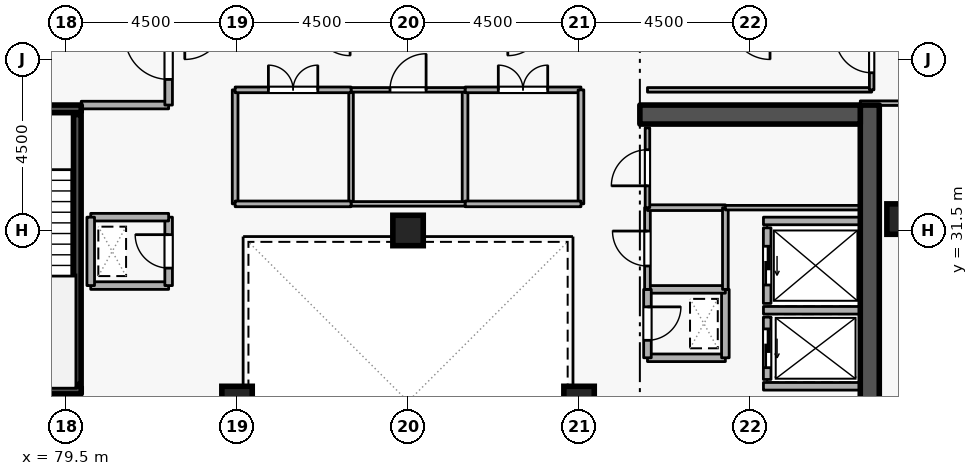
"""IFC4 building model, lengths in metres.
Left out: names, types, materials, properties, quantities, classifications, styles, units other than length and angle.
Written with IfcOpenShell. Run it as: python <this file> out.ifc"""

import sys

from ifc_helpers import new_model, si_unit, direction, frame, frame_2d, origin, origin_2d, place, context, subcontext, project, spatial, rectangle, extrude, element, fill, save


model = new_model("IFC4")
c1 = context("Model", 3, precision=1e-05, world=origin(), true_north=direction((0.0, 1.0)))
c2 = subcontext(c1, "Body", "Model", "MODEL_VIEW")
j1 = project(units=[si_unit("LENGTHUNIT", "METRE"), si_unit("PLANEANGLEUNIT", "RADIAN")], contexts=[c1])
p1 = place(None, origin())
s1 = spatial("IfcSite", under=j1, at=p1, CompositionType="ELEMENT")
p2 = place(p1, origin())
s2 = spatial("IfcBuilding", under=s1, at=p2, CompositionType="ELEMENT")
p3 = place(p2, frame((0.0, 0.0, 272.7)))
s3 = spatial("IfcBuildingStorey", under=s2, at=p3, CompositionType="ELEMENT", Elevation=272.7)
p4 = place(p3, frame((100.65, 19.2, 0.0), z_axis=(0.0, 0.0, 1.0), x_axis=(0.0, 1.0, 0.0)))
e1 = element("IfcWall", 1, at=p4, inside=s3, PredefinedType="SHEAR", context=c2, shape_type="SweptSolid", body=[
    extrude(rectangle(XDim=15.6, YDim=0.5, at=frame_2d((7.8, 0.0))), origin(), (0.0, 0.0, 1.0), 3.6),
])
p5 = place(p3, frame((94.6, 34.55, 0.0), z_axis=(0.0, 0.0, 1.0), x_axis=(1.0, 0.0, 0.0)))
e2 = element("IfcWall", 2, at=p5, inside=s3, PredefinedType="SHEAR", context=c2, shape_type="SweptSolid", body=[
    extrude(rectangle(XDim=5.8, YDim=0.5, at=frame_2d((2.9, 0.0))), origin(), (0.0, 0.0, 1.0), 3.6),
])
for number, where, z_axis, x_axis in (
    (3, (101.5, 31.8, 0.0), (0.0, 0.0, 1.0), (1.0, 0.0, 0.0)),
    (4, (93.0, 27.0, 0.0), (0.0, 0.0, 1.0), (1.0, 0.0, 0.0)),
    (5, (84.0, 27.0, 0.0), (0.0, 0.0, 1.0), (1.0, 0.0, 0.0)),
    (6, (88.5, 31.5, 0.0), (0.0, 0.0, 1.0), (1.0, 0.0, 0.0)),
):
    element("IfcColumn", number, at=place(p3, frame(where, z_axis=z_axis, x_axis=x_axis)), inside=s3, PredefinedType="COLUMN", context=c2, shape_type="SweptSolid", body=[
        extrude(rectangle(XDim=0.8, YDim=0.8, at=origin_2d()), origin(), (0.0, 0.0, 1.0), 3.6),
    ])
p6 = place(p3, frame((97.95, 29.22, 0.0), z_axis=(0.0, 0.0, 1.0), x_axis=(0.0, -1.0, 0.0)))
e7 = element("IfcWall", 7, at=p6, inside=s3, PredefinedType="STANDARD", context=c2, shape_type="SweptSolid", body=[
    extrude(rectangle(XDim=1.64, YDim=0.2, at=frame_2d((0.82, 0.0))), origin(), (0.0, 0.0, 1.0), 3.34),
])
p7 = place(p6, frame((0.31, 0.0, 0.0)))
e8 = element("IfcOpeningElement", 8, at=p7, cuts=e7, PredefinedType="OPENING", context=c2, shape_type="SweptSolid", body=[
    extrude(rectangle(XDim=1.02, YDim=2.06, at=frame_2d((0.51, 1.03))), frame((0.0, 0.11, 0.0), z_axis=(0.0, -1.0, 0.0), x_axis=(1.0, 0.0, 0.0)), (0.0, 0.0, 1.0), 0.22),
])
p8 = place(p3, frame((97.95, 31.57, 0.0), z_axis=(0.0, 0.0, 1.0), x_axis=(0.0, -1.0, 0.0)))
e9 = element("IfcWall", 9, at=p8, inside=s3, PredefinedType="STANDARD", context=c2, shape_type="SweptSolid", body=[
    extrude(rectangle(XDim=1.99, YDim=0.2, at=frame_2d((0.995, 0.0))), origin(), (0.0, 0.0, 1.0), 3.34),
])
p9 = place(p8, frame((0.485, 0.0, 0.0)))
e10 = element("IfcOpeningElement", 10, at=p9, cuts=e9, PredefinedType="OPENING", context=c2, shape_type="SweptSolid", body=[
    extrude(rectangle(XDim=1.02, YDim=2.06, at=frame_2d((0.51, 1.03))), frame((0.0, 0.11, 0.0), z_axis=(0.0, -1.0, 0.0), x_axis=(1.0, 0.0, 0.0)), (0.0, 0.0, 1.0), 0.22),
])
for number, where, z_axis, x_axis in (
    (11, (97.852, 29.4, 0.0), (0.0, 0.0, 1.0), (1.0, 0.0, 0.0)),
    (12, (97.852, 27.4, 0.0), (0.0, 0.0, 1.0), (1.0, 0.0, 0.0)),
    (13, (97.852, 31.75, 0.0), (0.0, 0.0, 1.0), (1.0, 0.0, 0.0)),
):
    element("IfcWall", number, at=place(p3, frame(where, z_axis=z_axis, x_axis=x_axis)), inside=s3, PredefinedType="STANDARD", context=c2, shape_type="SweptSolid", body=[
        extrude(rectangle(XDim=2.536, YDim=0.2, at=frame_2d((1.268, 0.0))), origin(), (0.0, 0.0, 1.0), 3.34),
    ])
p10 = place(p3, frame((76.55, 34.7, 0.0), z_axis=(0.0, 0.0, 1.0), x_axis=(1.0, 0.0, 0.0)))
e14 = element("IfcWall", 14, at=p10, inside=s3, PredefinedType="SHEAR", context=c2, shape_type="SweptSolid", body=[
    extrude(rectangle(XDim=3.35, YDim=0.2, at=frame_2d((1.675, 0.0))), origin(), (0.0, 0.0, 1.0), 3.6),
])
p11 = place(p10, frame((1.125, 0.0, 0.0)))
e15 = element("IfcOpeningElement", 15, at=p11, cuts=e14, PredefinedType="OPENING", context=c2, shape_type="SweptSolid", body=[
    extrude(rectangle(XDim=1.1, YDim=2.1, at=frame_2d((0.55, 1.05))), frame((0.0, 0.11, 0.0), z_axis=(0.0, -1.0, 0.0), x_axis=(1.0, 0.0, 0.0)), (0.0, 0.0, 1.0), 0.22),
])
p12 = place(p3, frame((79.9, 27.3, 0.0), z_axis=(0.0, 0.0, 1.0), x_axis=(-1.0, 0.0, 0.0)))
e16 = element("IfcWall", 16, at=p12, inside=s3, PredefinedType="SHEAR", context=c2, shape_type="SweptSolid", body=[
    extrude(rectangle(XDim=3.35, YDim=0.2, at=frame_2d((1.675, 0.0))), origin(), (0.0, 0.0, 1.0), 3.6),
])
p13 = place(p3, frame((79.797, 27.45, 0.0), z_axis=(0.0, 0.0, 1.0), x_axis=(0.0, 1.0, 0.0)))
e17 = element("IfcWall", 17, at=p13, inside=s3, PredefinedType="SHEAR", context=c2, shape_type="SweptSolid", body=[
    extrude(rectangle(XDim=7.1, YDim=0.2, at=frame_2d((3.55, 0.0))), origin(), (0.0, 0.0, 1.0), 3.6),
])
p14 = place(p3, frame((79.9, 34.8, 0.0), z_axis=(0.0, 0.0, 1.0), x_axis=(1.0, 0.0, 0.0)))
e18 = element("IfcWall", 18, at=p14, inside=s3, PredefinedType="STANDARD", context=c2, shape_type="SweptSolid", body=[
    extrude(rectangle(XDim=2.3, YDim=0.2, at=frame_2d((1.15, 0.0))), origin(), (0.0, 0.0, 1.0), 2.545),
])
p15 = place(p3, frame((82.2, 34.8, 0.0), z_axis=(0.0, 0.0, 1.0), x_axis=(0.0, 1.0, 0.0)))
e19 = element("IfcWall", 19, at=p15, inside=s3, PredefinedType="STANDARD", context=c2, shape_type="SweptSolid", body=[
    extrude(rectangle(XDim=2.5, YDim=0.2, at=frame_2d((1.25, 0.0))), origin(), (0.0, 0.0, 1.0), 3.34),
])
p16 = place(p15, frame((0.675, 0.0, 0.0)))
e20 = element("IfcOpeningElement", 20, at=p16, cuts=e19, PredefinedType="OPENING", context=c2, shape_type="SweptSolid", body=[
    extrude(rectangle(XDim=1.15, YDim=2.1, at=frame_2d((0.575, 1.05))), frame((0.0, 0.11, 0.0), z_axis=(0.0, -1.0, 0.0), x_axis=(1.0, 0.0, 0.0)), (0.0, 0.0, 1.0), 0.22),
])
p17 = place(p3, frame((94.8, 28.15, 0.0), z_axis=(0.0, 0.0, 1.0), x_axis=(1.0, 0.0, 0.0)))
e21 = element("IfcWall", 21, at=p17, inside=s3, PredefinedType="STANDARD", context=c2, shape_type="SweptSolid", body=[
    extrude(rectangle(XDim=2.05, YDim=0.2, at=frame_2d((1.025, 0.0))), origin(), (0.0, 0.0, 1.0), 3.34),
])
p18 = place(p3, frame((96.85, 28.15, 0.0), z_axis=(0.0, 0.0, 1.0), x_axis=(0.0, 1.0, 0.0)))
e22 = element("IfcWall", 22, at=p18, inside=s3, PredefinedType="STANDARD", context=c2, shape_type="SweptSolid", body=[
    extrude(rectangle(XDim=1.8, YDim=0.2, at=frame_2d((0.9, 0.0))), origin(), (0.0, 0.0, 1.0), 3.34),
])
p19 = place(p3, frame((96.85, 29.95, 0.0), z_axis=(0.0, 0.0, 1.0), x_axis=(-1.0, 0.0, 0.0)))
e23 = element("IfcWall", 23, at=p19, inside=s3, PredefinedType="STANDARD", context=c2, shape_type="SweptSolid", body=[
    extrude(rectangle(XDim=2.05, YDim=0.2, at=frame_2d((1.025, 0.0))), origin(), (0.0, 0.0, 1.0), 3.34),
])
p20 = place(p3, frame((94.8, 29.95, 0.0), z_axis=(0.0, 0.0, 1.0), x_axis=(0.0, -1.0, 0.0)))
e24 = element("IfcWall", 24, at=p20, inside=s3, PredefinedType="STANDARD", context=c2, shape_type="SweptSolid", body=[
    extrude(rectangle(XDim=1.8, YDim=0.2, at=frame_2d((0.9, 0.0))), origin(), (0.0, 0.0, 1.0), 3.34),
])
p21 = place(p20, frame((0.46, 0.0, 0.0)))
e25 = element("IfcOpeningElement", 25, at=p21, cuts=e24, PredefinedType="OPENING", context=c2, shape_type="SweptSolid", body=[
    extrude(rectangle(XDim=0.88, YDim=2.04, at=frame_2d((0.44, 1.02))), frame((0.0, 0.11, 0.0), z_axis=(0.0, -1.0, 0.0), x_axis=(1.0, 0.0, 0.0)), (0.0, 0.0, 1.0), 0.22),
])
p22 = place(p3, frame((80.15, 30.05, 0.0), z_axis=(0.0, 0.0, 1.0), x_axis=(1.0, 0.0, 0.0)))
e26 = element("IfcWall", 26, at=p22, inside=s3, PredefinedType="STANDARD", context=c2, shape_type="SweptSolid", body=[
    extrude(rectangle(XDim=2.05, YDim=0.2, at=frame_2d((1.025, 0.0))), origin(), (0.0, 0.0, 1.0), 3.34),
])
p23 = place(p3, frame((82.2, 30.05, 0.0), z_axis=(0.0, 0.0, 1.0), x_axis=(0.0, 1.0, 0.0)))
e27 = element("IfcWall", 27, at=p23, inside=s3, PredefinedType="STANDARD", context=c2, shape_type="SweptSolid", body=[
    extrude(rectangle(XDim=1.8, YDim=0.2, at=frame_2d((0.9, 0.0))), origin(), (0.0, 0.0, 1.0), 3.34),
])
p24 = place(p23, frame((0.46, 0.0, 0.0)))
e28 = element("IfcOpeningElement", 28, at=p24, cuts=e27, PredefinedType="OPENING", context=c2, shape_type="SweptSolid", body=[
    extrude(rectangle(XDim=0.88, YDim=2.04, at=frame_2d((0.44, 1.02))), frame((0.0, 0.11, 0.0), z_axis=(0.0, -1.0, 0.0), x_axis=(1.0, 0.0, 0.0)), (0.0, 0.0, 1.0), 0.22),
])
p25 = place(p3, frame((82.2, 31.85, 0.0), z_axis=(0.0, 0.0, 1.0), x_axis=(-1.0, 0.0, 0.0)))
e29 = element("IfcWall", 29, at=p25, inside=s3, PredefinedType="STANDARD", context=c2, shape_type="SweptSolid", body=[
    extrude(rectangle(XDim=2.05, YDim=0.2, at=frame_2d((1.025, 0.0))), origin(), (0.0, 0.0, 1.0), 3.34),
])
p26 = place(p3, frame((80.15, 31.85, 0.0), z_axis=(0.0, 0.0, 1.0), x_axis=(0.0, -1.0, 0.0)))
e30 = element("IfcWall", 30, at=p26, inside=s3, PredefinedType="STANDARD", context=c2, shape_type="SweptSolid", body=[
    extrude(rectangle(XDim=1.8, YDim=0.2, at=frame_2d((0.9, 0.0))), origin(), (0.0, 0.0, 1.0), 3.34),
])
p27 = place(p3, frame((94.8, 29.95, 0.0), z_axis=(0.0, 0.0, 1.0), x_axis=(0.0, 1.0, 0.0)))
e31 = element("IfcWall", 31, at=p27, inside=s3, PredefinedType="PARTITIONING", context=c2, shape_type="SweptSolid", body=[
    extrude(rectangle(XDim=2.15, YDim=0.15, at=frame_2d((1.075, 0.0))), origin(), (0.0, 0.0, 1.0), 3.34),
])
p28 = place(p27, frame((0.615, 0.0, 0.0)))
e32 = element("IfcOpeningElement", 32, at=p28, cuts=e31, PredefinedType="OPENING", context=c2, shape_type="SweptSolid", body=[
    extrude(rectangle(XDim=0.92, YDim=2.08, at=frame_2d((0.46, 1.04))), frame((0.0, 0.085, 0.0), z_axis=(0.0, -1.0, 0.0), x_axis=(1.0, 0.0, 0.0)), (0.0, 0.0, 1.0), 0.17),
])
p29 = place(p3, frame((94.8, 32.1, 0.0), z_axis=(0.0, 0.0, 1.0), x_axis=(1.0, 0.0, 0.0)))
e33 = element("IfcWall", 33, at=p29, inside=s3, PredefinedType="PARTITIONING", context=c2, shape_type="SweptSolid", body=[
    extrude(rectangle(XDim=2.05, YDim=0.15, at=frame_2d((1.025, 0.0))), origin(), (0.0, 0.0, 1.0), 3.34),
])
p30 = place(p3, frame((96.85, 32.1, 0.0), z_axis=(0.0, 0.0, 1.0), x_axis=(0.0, -1.0, 0.0)))
e34 = element("IfcWall", 34, at=p30, inside=s3, PredefinedType="PARTITIONING", context=c2, shape_type="SweptSolid", body=[
    extrude(rectangle(XDim=2.15, YDim=0.15, at=frame_2d((1.075, 0.0))), origin(), (0.0, 0.0, 1.0), 3.34),
])
p31 = place(p3, frame((94.8, 32.1, 0.0), z_axis=(0.0, 0.0, 1.0), x_axis=(0.0, 1.0, 0.0)))
e35 = element("IfcWall", 35, at=p31, inside=s3, PredefinedType="PARTITIONING", context=c2, shape_type="SweptSolid", body=[
    extrude(rectangle(XDim=2.1, YDim=0.12, at=frame_2d((1.05, 0.0))), origin(), (0.0, 0.0, 1.0), 3.34),
])
p32 = place(p31, frame((0.575, 0.0, 0.0)))
e36 = element("IfcOpeningElement", 36, at=p32, cuts=e35, PredefinedType="OPENING", context=c2, shape_type="SweptSolid", body=[
    extrude(rectangle(XDim=0.95, YDim=2.1, at=frame_2d((0.475, 1.05))), frame((0.0, 0.07, 0.0), z_axis=(0.0, -1.0, 0.0), x_axis=(1.0, 0.0, 0.0)), (0.0, 0.0, 1.0), 0.14),
])
p33 = place(p3, frame((100.4, 32.1, 0.0), z_axis=(0.0, 0.0, 1.0), x_axis=(-1.0, 0.0, 0.0)))
e37 = element("IfcWall", 37, at=p33, inside=s3, PredefinedType="PARTITIONING", context=c2, shape_type="SweptSolid", body=[
    extrude(rectangle(XDim=3.55, YDim=0.12, at=frame_2d((1.775, 0.0))), origin(), (0.0, 0.0, 1.0), 3.34),
])
p34 = place(p3, frame((94.8, 35.2, 0.0), z_axis=(0.0, 0.0, 1.0), x_axis=(1.0, 0.0, 0.0)))
e38 = element("IfcWall", 38, at=p34, inside=s3, PredefinedType="PARTITIONING", context=c2, shape_type="SweptSolid", body=[
    extrude(rectangle(XDim=5.9, YDim=0.12, at=frame_2d((2.95, 0.0))), origin(), (0.0, 0.0, 1.0), 3.34),
])
p35 = place(p3, frame((100.7, 35.2, 0.0), z_axis=(0.0, 0.0, 1.0), x_axis=(0.0, 1.0, 0.0)))
e39 = element("IfcWall", 39, at=p35, inside=s3, PredefinedType="PARTITIONING", context=c2, shape_type="SweptSolid", body=[
    extrude(rectangle(XDim=1.85, YDim=0.12, at=frame_2d((0.925, 0.0))), origin(), (0.0, 0.0, 1.0), 3.34),
])
p36 = place(p35, frame((0.45, 0.0, 0.0)))
e40 = element("IfcOpeningElement", 40, at=p36, cuts=e39, PredefinedType="OPENING", context=c2, shape_type="SweptSolid", body=[
    extrude(rectangle(XDim=0.95, YDim=2.1, at=frame_2d((0.475, 1.05))), frame((0.0, 0.07, 0.0), z_axis=(0.0, -1.0, 0.0), x_axis=(1.0, 0.0, 0.0)), (0.0, 0.0, 1.0), 0.14),
])
p37 = place(p3, frame((112.22, 34.85, 0.0), z_axis=(0.0, 0.0, 1.0), x_axis=(-1.0, 0.0, 0.0)))
e41 = element("IfcWall", 41, at=p37, inside=s3, PredefinedType="PARTITIONING", context=c2, shape_type="SweptSolid", body=[
    extrude(rectangle(XDim=11.82, YDim=0.12, at=frame_2d((5.91, 0.0))), origin(), (0.0, 0.0, 1.0), 2.545),
])
p38 = place(p3, frame((90.0, 32.2, 0.0), z_axis=(0.0, 0.0, 1.0), x_axis=(0.0, 1.0, 0.0)))
e42 = element("IfcWall", 42, at=p38, inside=s3, PredefinedType="PARTITIONING", context=c2, shape_type="SweptSolid", body=[
    extrude(rectangle(XDim=3.0, YDim=0.15, at=frame_2d((1.5, 0.0))), origin(), (0.0, 0.0, 1.0), 3.34),
])
p39 = place(p3, frame((90.0, 35.2, 0.0), z_axis=(0.0, 0.0, 1.0), x_axis=(1.0, 0.0, 0.0)))
e43 = element("IfcWall", 43, at=p39, inside=s3, PredefinedType="PARTITIONING", context=c2, shape_type="SweptSolid", body=[
    extrude(rectangle(XDim=3.05, YDim=0.15, at=frame_2d((1.525, 0.0))), origin(), (0.0, 0.0, 1.0), 3.34),
])
p40 = place(p39, frame((0.875, 0.0, 0.0)))
e44 = element("IfcOpeningElement", 44, at=p40, cuts=e43, PredefinedType="OPENING", context=c2, shape_type="SweptSolid", body=[
    extrude(rectangle(XDim=1.3, YDim=2.12, at=frame_2d((0.65, 1.06))), frame((0.0, 0.085, 0.0), z_axis=(0.0, -1.0, 0.0), x_axis=(1.0, 0.0, 0.0)), (0.0, 0.0, 1.0), 0.17),
])
p41 = place(p3, frame((93.05, 35.2, 0.0), z_axis=(0.0, 0.0, 1.0), x_axis=(0.0, -1.0, 0.0)))
e45 = element("IfcWall", 45, at=p41, inside=s3, PredefinedType="PARTITIONING", context=c2, shape_type="SweptSolid", body=[
    extrude(rectangle(XDim=3.0, YDim=0.15, at=frame_2d((1.5, 0.0))), origin(), (0.0, 0.0, 1.0), 3.34),
])
p42 = place(p3, frame((93.05, 32.2, 0.0), z_axis=(0.0, 0.0, 1.0), x_axis=(-1.0, 0.0, 0.0)))
e46 = element("IfcWall", 46, at=p42, inside=s3, PredefinedType="PARTITIONING", context=c2, shape_type="SweptSolid", body=[
    extrude(rectangle(XDim=3.05, YDim=0.15, at=frame_2d((1.525, 0.0))), origin(), (0.0, 0.0, 1.0), 3.34),
])
p43 = place(p3, frame((87.0, 32.2, 0.0), z_axis=(0.0, 0.0, 1.0), x_axis=(0.0, 1.0, 0.0)))
e47 = element("IfcWall", 47, at=p43, inside=s3, PredefinedType="PARTITIONING", context=c2, shape_type="SweptSolid", body=[
    extrude(rectangle(XDim=3.0, YDim=0.12, at=frame_2d((1.5, 0.0))), origin(), (0.0, 0.0, 1.0), 3.34),
])
p44 = place(p3, frame((87.0, 35.2, 0.0), z_axis=(0.0, 0.0, 1.0), x_axis=(1.0, 0.0, 0.0)))
e48 = element("IfcWall", 48, at=p44, inside=s3, PredefinedType="PARTITIONING", context=c2, shape_type="SweptSolid", body=[
    extrude(rectangle(XDim=3.0, YDim=0.12, at=frame_2d((1.5, 0.0))), origin(), (0.0, 0.0, 1.0), 3.34),
])
p45 = place(p44, frame((1.025, 0.0, 0.0)))
e49 = element("IfcOpeningElement", 49, at=p45, cuts=e48, PredefinedType="OPENING", context=c2, shape_type="SweptSolid", body=[
    extrude(rectangle(XDim=0.95, YDim=2.1, at=frame_2d((0.475, 1.05))), frame((0.0, 0.07, 0.0), z_axis=(0.0, -1.0, 0.0), x_axis=(1.0, 0.0, 0.0)), (0.0, 0.0, 1.0), 0.14),
])
p46 = place(p3, frame((90.0, 32.2, 0.0), z_axis=(0.0, 0.0, 1.0), x_axis=(-1.0, 0.0, 0.0)))
e50 = element("IfcWall", 50, at=p46, inside=s3, PredefinedType="PARTITIONING", context=c2, shape_type="SweptSolid", body=[
    extrude(rectangle(XDim=3.0, YDim=0.12, at=frame_2d((1.5, 0.0))), origin(), (0.0, 0.0, 1.0), 3.34),
])
p47 = place(p3, frame((83.95, 32.2, 0.0), z_axis=(0.0, 0.0, 1.0), x_axis=(0.0, 1.0, 0.0)))
e51 = element("IfcWall", 51, at=p47, inside=s3, PredefinedType="PARTITIONING", context=c2, shape_type="SweptSolid", body=[
    extrude(rectangle(XDim=3.0, YDim=0.15, at=frame_2d((1.5, 0.0))), origin(), (0.0, 0.0, 1.0), 3.34),
])
p48 = place(p3, frame((83.95, 35.2, 0.0), z_axis=(0.0, 0.0, 1.0), x_axis=(1.0, 0.0, 0.0)))
e52 = element("IfcWall", 52, at=p48, inside=s3, PredefinedType="PARTITIONING", context=c2, shape_type="SweptSolid", body=[
    extrude(rectangle(XDim=3.05, YDim=0.15, at=frame_2d((1.525, 0.0))), origin(), (0.0, 0.0, 1.0), 3.34),
])
p49 = place(p48, frame((0.875, 0.0, 0.0)))
e53 = element("IfcOpeningElement", 53, at=p49, cuts=e52, PredefinedType="OPENING", context=c2, shape_type="SweptSolid", body=[
    extrude(rectangle(XDim=1.3, YDim=2.12, at=frame_2d((0.65, 1.06))), frame((0.0, 0.085, 0.0), z_axis=(0.0, -1.0, 0.0), x_axis=(1.0, 0.0, 0.0)), (0.0, 0.0, 1.0), 0.17),
])
p50 = place(p3, frame((87.0, 32.2, 0.0), z_axis=(0.0, 0.0, 1.0), x_axis=(-1.0, 0.0, 0.0)))
e54 = element("IfcWall", 54, at=p50, inside=s3, PredefinedType="PARTITIONING", context=c2, shape_type="SweptSolid", body=[
    extrude(rectangle(XDim=3.05, YDim=0.15, at=frame_2d((1.525, 0.0))), origin(), (0.0, 0.0, 1.0), 3.34),
])
p51 = place(p7, origin())
e55 = element("IfcDoor", 55, at=p51, inside=s3, OperationType="SLIDING_TO_LEFT", PredefinedType="DOOR", context=c2, shape_type="SweptSolid", body=[
    extrude(rectangle(XDim=1.02, YDim=2.06, at=frame_2d((0.51, 1.03))), frame((0.0, 0.025, 0.0), z_axis=(0.0, -1.0, 0.0), x_axis=(1.0, 0.0, 0.0)), (0.0, 0.0, 1.0), 0.05),
])
fill(e8, e55)
p52 = place(p9, origin())
e56 = element("IfcDoor", 56, at=p52, inside=s3, OperationType="SLIDING_TO_LEFT", PredefinedType="DOOR", context=c2, shape_type="SweptSolid", body=[
    extrude(rectangle(XDim=1.02, YDim=2.06, at=frame_2d((0.51, 1.03))), frame((0.0, 0.025, 0.0), z_axis=(0.0, -1.0, 0.0), x_axis=(1.0, 0.0, 0.0)), (0.0, 0.0, 1.0), 0.05),
])
fill(e10, e56)
p53 = place(p16, origin())
e57 = element("IfcDoor", 57, at=p53, inside=s3, OperationType="SINGLE_SWING_RIGHT", PredefinedType="DOOR", context=c2, shape_type="SweptSolid", body=[
    extrude(rectangle(XDim=1.15, YDim=2.1, at=frame_2d((0.575, 1.05))), frame((0.0, 0.025, 0.0), z_axis=(0.0, -1.0, 0.0), x_axis=(1.0, 0.0, 0.0)), (0.0, 0.0, 1.0), 0.05),
])
fill(e20, e57)
p54 = place(p21, origin())
e58 = element("IfcDoor", 58, at=p54, inside=s3, OperationType="SINGLE_SWING_LEFT", PredefinedType="DOOR", context=c2, shape_type="SweptSolid", body=[
    extrude(rectangle(XDim=0.88, YDim=2.04, at=frame_2d((0.44, 1.02))), frame((0.0, 0.025, 0.0), z_axis=(0.0, -1.0, 0.0), x_axis=(1.0, 0.0, 0.0)), (0.0, 0.0, 1.0), 0.05),
])
fill(e25, e58)
p55 = place(p24, origin())
e59 = element("IfcDoor", 59, at=p55, inside=s3, OperationType="SINGLE_SWING_RIGHT", PredefinedType="DOOR", context=c2, shape_type="SweptSolid", body=[
    extrude(rectangle(XDim=0.88, YDim=2.04, at=frame_2d((0.44, 1.02))), frame((0.0, 0.025, 0.0), z_axis=(0.0, -1.0, 0.0), x_axis=(1.0, 0.0, 0.0)), (0.0, 0.0, 1.0), 0.05),
])
fill(e28, e59)
p56 = place(p28, origin())
e60 = element("IfcDoor", 60, at=p56, inside=s3, OperationType="SINGLE_SWING_RIGHT", PredefinedType="DOOR", context=c2, shape_type="SweptSolid", body=[
    extrude(rectangle(XDim=0.92, YDim=2.08, at=frame_2d((0.46, 1.04))), frame((0.0, 0.025, 0.0), z_axis=(0.0, -1.0, 0.0), x_axis=(1.0, 0.0, 0.0)), (0.0, 0.0, 1.0), 0.05),
])
fill(e32, e60)
p57 = place(p32, origin())
e61 = element("IfcDoor", 61, at=p57, inside=s3, OperationType="SINGLE_SWING_LEFT", PredefinedType="DOOR", context=c2, shape_type="SweptSolid", body=[
    extrude(rectangle(XDim=0.95, YDim=2.1, at=frame_2d((0.475, 1.05))), frame((0.0, 0.025, 0.0), z_axis=(0.0, -1.0, 0.0), x_axis=(1.0, 0.0, 0.0)), (0.0, 0.0, 1.0), 0.05),
])
fill(e36, e61)
p58 = place(p36, origin())
e62 = element("IfcDoor", 62, at=p58, inside=s3, OperationType="SINGLE_SWING_RIGHT", PredefinedType="DOOR", context=c2, shape_type="SweptSolid", body=[
    extrude(rectangle(XDim=0.95, YDim=2.1, at=frame_2d((0.475, 1.05))), frame((0.0, 0.025, 0.0), z_axis=(0.0, -1.0, 0.0), x_axis=(1.0, 0.0, 0.0)), (0.0, 0.0, 1.0), 0.05),
])
fill(e40, e62)
p59 = place(p40, origin())
e63 = element("IfcDoor", 63, at=p59, inside=s3, OperationType="DOUBLE_DOOR_SINGLE_SWING", PredefinedType="DOOR", context=c2, shape_type="SweptSolid", body=[
    extrude(rectangle(XDim=1.3, YDim=2.12, at=frame_2d((0.65, 1.06))), frame((0.0, 0.025, 0.0), z_axis=(0.0, -1.0, 0.0), x_axis=(1.0, 0.0, 0.0)), (0.0, 0.0, 1.0), 0.05),
])
fill(e44, e63)
p60 = place(p45, origin())
e64 = element("IfcDoor", 64, at=p60, inside=s3, OperationType="SINGLE_SWING_RIGHT", PredefinedType="DOOR", context=c2, shape_type="SweptSolid", body=[
    extrude(rectangle(XDim=0.95, YDim=2.1, at=frame_2d((0.475, 1.05))), frame((0.0, 0.025, 0.0), z_axis=(0.0, -1.0, 0.0), x_axis=(1.0, 0.0, 0.0)), (0.0, 0.0, 1.0), 0.05),
])
fill(e49, e64)
p61 = place(p49, origin())
e65 = element("IfcDoor", 65, at=p61, inside=s3, OperationType="DOUBLE_DOOR_SINGLE_SWING", PredefinedType="DOOR", context=c2, shape_type="SweptSolid", body=[
    extrude(rectangle(XDim=1.3, YDim=2.12, at=frame_2d((0.65, 1.06))), frame((0.0, 0.025, 0.0), z_axis=(0.0, -1.0, 0.0), x_axis=(1.0, 0.0, 0.0)), (0.0, 0.0, 1.0), 0.05),
])
fill(e53, e65)
save(model, sys.argv[1])
